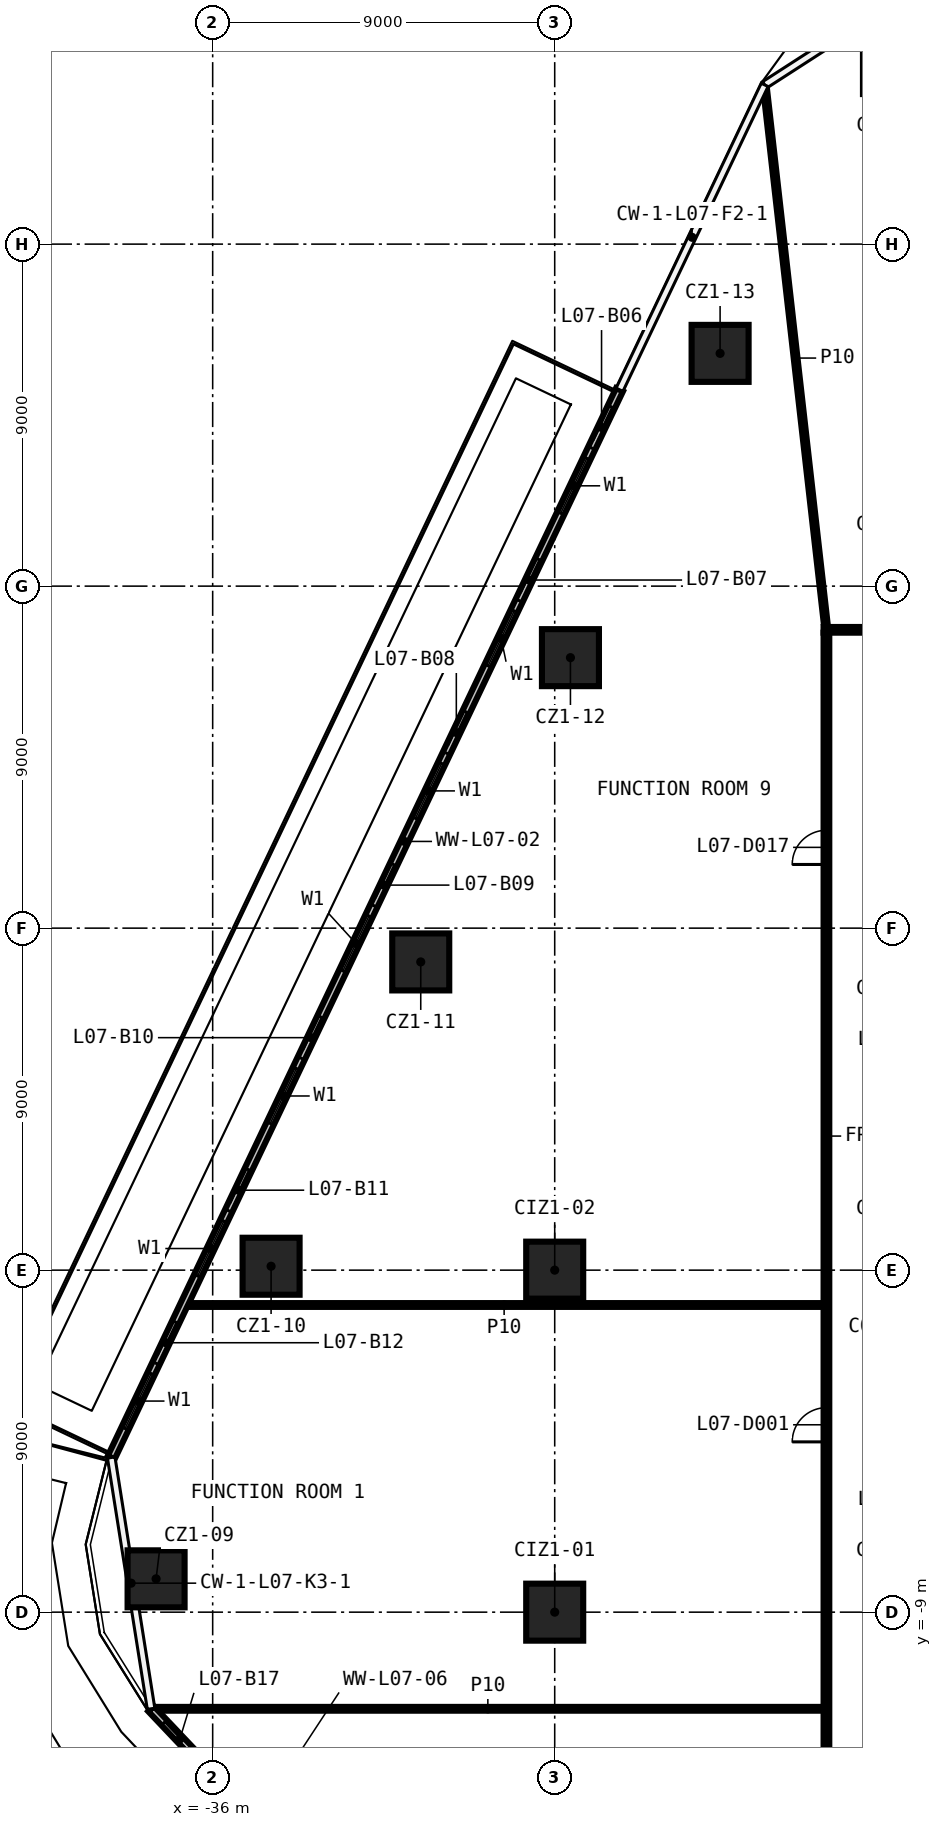
"""IFC4 building model, lengths in metres.
Left out: names, types, materials, properties, quantities, classifications, styles, units other than length and angle.
Written with IfcOpenShell. Run it as: python <this file> out.ifc"""

import sys

from ifc_helpers import new_model, si_unit, direction, frame, frame_2d, origin, origin_2d, place, context, subcontext, project, spatial, rectangle, extrude, element, fill, save


model = new_model("IFC4")
c1 = context("Model", 3, precision=1e-05, world=origin(), true_north=direction((0.0, 1.0)))
c2 = subcontext(c1, "Body", "Model", "MODEL_VIEW")
j1 = project(units=[si_unit("LENGTHUNIT", "METRE"), si_unit("PLANEANGLEUNIT", "RADIAN")], contexts=[c1])
p1 = place(None, origin())
s1 = spatial("IfcSite", under=j1, at=p1, CompositionType="ELEMENT")
p2 = place(p1, origin())
s2 = spatial("IfcBuilding", under=s1, at=p2, CompositionType="ELEMENT")
p3 = place(p2, frame((0.0, 0.0, 47.7)))
s3 = spatial("IfcBuildingStorey", under=s2, at=p3, CompositionType="ELEMENT", Elevation=47.7)
for number, where, z_axis, x_axis in (
    (1, (-37.489, -8.123, 0.0), (0.0, 0.0, 1.0), (1.0, 0.0, 0.0)),
    (2, (-34.463, 0.103, 0.0), (0.0, 0.0, 1.0), (1.0, 0.0, 0.0)),
    (3, (-30.525, 8.111, 0.0), (0.0, 0.0, 1.0), (1.0, 0.0, 0.0)),
    (4, (-26.586, 16.118, 0.0), (0.0, 0.0, 1.0), (1.0, 0.0, 0.0)),
    (5, (-22.648, 24.125, 0.0), (0.0, 0.0, 1.0), (1.0, 0.0, 0.0)),
    (6, (-27.0, -9.0, 0.0), (0.0, 0.0, 1.0), (1.0, 0.0, 0.0)),
    (7, (-27.0, 0.0, 0.0), (0.0, 0.0, 1.0), (1.0, 0.0, 0.0)),
):
    element("IfcColumn", number, at=place(p3, frame(where, z_axis=z_axis, x_axis=x_axis)), inside=s3, PredefinedType="COLUMN", context=c2, shape_type="SweptSolid", body=[
        extrude(rectangle(XDim=1.5, YDim=1.5, at=origin_2d()), origin(), (0.0, 0.0, 1.0), 3.3),
    ])
p4 = place(p3, frame((-37.594, -11.543, 0.0), z_axis=(0.0, 0.0, 1.0), x_axis=(1.0, 0.0, 0.0)))
e8 = element("IfcWall", 8, at=p4, inside=s3, PredefinedType="PARTITIONING", context=c2, shape_type="SweptSolid", body=[
    extrude(rectangle(XDim=17.668, YDim=0.1, at=frame_2d((8.834, 0.0))), origin(), (0.0, 0.0, 1.0), 3.3),
])
p5 = place(p3, frame((-36.737, -0.917, 0.0), z_axis=(0.0, 0.0, 1.0), x_axis=(1.0, 0.0, 0.0)))
e9 = element("IfcWall", 9, at=p5, inside=s3, PredefinedType="PARTITIONING", context=c2, shape_type="SweptSolid", body=[
    extrude(rectangle(XDim=16.812, YDim=0.1, at=frame_2d((8.406, 0.0))), origin(), (0.0, 0.0, 1.0), 3.3),
])
p6 = place(p3, frame((-19.925, 16.85, 0.0), z_axis=(0.0, 0.0, 1.0), x_axis=(1.0, 0.0, 0.0)))
e10 = element("IfcWall", 10, at=p6, inside=s3, PredefinedType="PARTITIONING", context=c2, shape_type="SweptSolid", body=[
    extrude(rectangle(XDim=39.85, YDim=0.15, at=frame_2d((19.925, 0.0))), origin(), (0.0, 0.0, 1.0), 3.3),
])
p7 = place(p6, frame((31.643, 0.0, 0.0)))
e11 = element("IfcOpeningElement", 11, at=p7, cuts=e10, PredefinedType="OPENING", context=c2, shape_type="SweptSolid", body=[
    extrude(rectangle(XDim=0.9, YDim=2.1, at=frame_2d((0.45, 1.05))), frame((0.0, 0.085, 0.0), z_axis=(0.0, -1.0, 0.0), x_axis=(1.0, 0.0, 0.0)), (0.0, 0.0, 1.0), 0.17),
])
p8 = place(p6, frame((22.056, 0.0, 0.0)))
e12 = element("IfcOpeningElement", 12, at=p8, cuts=e10, PredefinedType="OPENING", context=c2, shape_type="SweptSolid", body=[
    extrude(rectangle(XDim=0.9, YDim=2.1, at=frame_2d((0.45, 1.05))), frame((0.0, 0.085, 0.0), z_axis=(0.0, -1.0, 0.0), x_axis=(1.0, 0.0, 0.0)), (0.0, 0.0, 1.0), 0.17),
])
p9 = place(p6, frame((14.831, 0.0, 0.0)))
e13 = element("IfcOpeningElement", 13, at=p9, cuts=e10, PredefinedType="OPENING", context=c2, shape_type="SweptSolid", body=[
    extrude(rectangle(XDim=1.0, YDim=2.1, at=frame_2d((0.5, 1.05))), frame((0.0, 0.085, 0.0), z_axis=(0.0, -1.0, 0.0), x_axis=(1.0, 0.0, 0.0)), (0.0, 0.0, 1.0), 0.17),
])
p10 = place(p3, frame((-19.85, -16.775, 0.0), z_axis=(0.0, 0.0, 1.0), x_axis=(0.0, 1.0, 0.0)))
e14 = element("IfcWall", 14, at=p10, inside=s3, PredefinedType="PARTITIONING", context=c2, shape_type="SweptSolid", body=[
    extrude(rectangle(XDim=33.55, YDim=0.15, at=frame_2d((16.775, 0.0))), origin(), (0.0, 0.0, 1.0), 3.3),
])
p11 = place(p10, frame((12.256, 0.0, 0.0)))
e15 = element("IfcOpeningElement", 15, at=p11, cuts=e14, PredefinedType="OPENING", context=c2, shape_type="SweptSolid", body=[
    extrude(rectangle(XDim=0.9, YDim=2.1, at=frame_2d((0.45, 1.05))), frame((0.0, 0.085, 0.0), z_axis=(0.0, -1.0, 0.0), x_axis=(1.0, 0.0, 0.0)), (0.0, 0.0, 1.0), 0.17),
])
p12 = place(p10, frame((3.254, 0.0, 0.0)))
e16 = element("IfcOpeningElement", 16, at=p12, cuts=e14, PredefinedType="OPENING", context=c2, shape_type="SweptSolid", body=[
    extrude(rectangle(XDim=0.9, YDim=2.1, at=frame_2d((0.45, 1.05))), frame((0.0, 0.085, 0.0), z_axis=(0.0, -1.0, 0.0), x_axis=(1.0, 0.0, 0.0)), (0.0, 0.0, 1.0), 0.17),
])
p13 = place(p10, frame((27.451, 0.0, 0.0)))
e17 = element("IfcOpeningElement", 17, at=p13, cuts=e14, PredefinedType="OPENING", context=c2, shape_type="SweptSolid", body=[
    extrude(rectangle(XDim=0.9, YDim=2.1, at=frame_2d((0.45, 1.05))), frame((0.0, 0.085, 0.0), z_axis=(0.0, -1.0, 0.0), x_axis=(1.0, 0.0, 0.0)), (0.0, 0.0, 1.0), 0.17),
])
p14 = place(p3, frame((-21.472, 31.153, 0.0), z_axis=(0.0, 0.0, 1.0), x_axis=(0.112685540228, -0.993630700524, 0.0)))
e18 = element("IfcWall", 18, at=p14, inside=s3, PredefinedType="PARTITIONING", context=c2, shape_type="SweptSolid", body=[
    extrude(rectangle(XDim=14.395, YDim=0.1, at=frame_2d((7.197, 0.0))), origin(), (0.0, 0.0, 1.0), 3.3),
])
p15 = place(p3, frame((-25.295, 23.168, 0.0), z_axis=(0.0, 0.0, 1.0), x_axis=(-0.429791665344, -0.902928083737, 0.0)))
e19 = element("IfcWall", 19, at=p15, inside=s3, PredefinedType="SOLIDWALL", context=c2, shape_type="SweptSolid", body=[
    extrude(rectangle(XDim=31.12, YDim=0.2, at=frame_2d((15.56, 0.0))), origin(), (0.0, 0.0, 1.0), 3.3),
])
p16 = place(p15, frame((2.0, 0.0, 0.6)))
e20 = element("IfcOpeningElement", 20, at=p16, cuts=e19, PredefinedType="OPENING", context=c2, shape_type="SweptSolid", body=[
    extrude(rectangle(XDim=1.6, YDim=2.4, at=frame_2d((0.8, 1.2))), frame((0.0, 0.11, 0.0), z_axis=(0.0, -1.0, 0.0), x_axis=(1.0, 0.0, 0.0)), (0.0, 0.0, 1.0), 0.22),
])
p17 = place(p15, frame((0.5, 0.0, 0.0)))
e21 = element("IfcOpeningElement", 21, at=p17, cuts=e19, PredefinedType="OPENING", context=c2, shape_type="SweptSolid", body=[
    extrude(rectangle(XDim=1.2, YDim=2.4, at=frame_2d((0.6, 1.2))), frame((0.0, 0.11, 0.0), z_axis=(0.0, -1.0, 0.0), x_axis=(1.0, 0.0, 0.0)), (0.0, 0.0, 1.0), 0.22),
])
p18 = place(p15, frame((6.446, 0.0, 0.6)))
e22 = element("IfcOpeningElement", 22, at=p18, cuts=e19, PredefinedType="OPENING", context=c2, shape_type="SweptSolid", body=[
    extrude(rectangle(XDim=1.6, YDim=2.4, at=frame_2d((0.8, 1.2))), frame((0.0, 0.11, 0.0), z_axis=(0.0, -1.0, 0.0), x_axis=(1.0, 0.0, 0.0)), (0.0, 0.0, 1.0), 0.22),
])
p19 = place(p15, frame((4.946, 0.0, 0.0)))
e23 = element("IfcOpeningElement", 23, at=p19, cuts=e19, PredefinedType="OPENING", context=c2, shape_type="SweptSolid", body=[
    extrude(rectangle(XDim=1.2, YDim=2.4, at=frame_2d((0.6, 1.2))), frame((0.0, 0.11, 0.0), z_axis=(0.0, -1.0, 0.0), x_axis=(1.0, 0.0, 0.0)), (0.0, 0.0, 1.0), 0.22),
])
p20 = place(p15, frame((10.891, 0.0, 0.6)))
e24 = element("IfcOpeningElement", 24, at=p20, cuts=e19, PredefinedType="OPENING", context=c2, shape_type="SweptSolid", body=[
    extrude(rectangle(XDim=1.6, YDim=2.4, at=frame_2d((0.8, 1.2))), frame((0.0, 0.11, 0.0), z_axis=(0.0, -1.0, 0.0), x_axis=(1.0, 0.0, 0.0)), (0.0, 0.0, 1.0), 0.22),
])
p21 = place(p15, frame((9.391, 0.0, 0.0)))
e25 = element("IfcOpeningElement", 25, at=p21, cuts=e19, PredefinedType="OPENING", context=c2, shape_type="SweptSolid", body=[
    extrude(rectangle(XDim=1.2, YDim=2.4, at=frame_2d((0.6, 1.2))), frame((0.0, 0.11, 0.0), z_axis=(0.0, -1.0, 0.0), x_axis=(1.0, 0.0, 0.0)), (0.0, 0.0, 1.0), 0.22),
])
p22 = place(p15, frame((15.337, 0.0, 0.6)))
e26 = element("IfcOpeningElement", 26, at=p22, cuts=e19, PredefinedType="OPENING", context=c2, shape_type="SweptSolid", body=[
    extrude(rectangle(XDim=1.6, YDim=2.4, at=frame_2d((0.8, 1.2))), frame((0.0, 0.11, 0.0), z_axis=(0.0, -1.0, 0.0), x_axis=(1.0, 0.0, 0.0)), (0.0, 0.0, 1.0), 0.22),
])
p23 = place(p15, frame((13.837, 0.0, 0.0)))
e27 = element("IfcOpeningElement", 27, at=p23, cuts=e19, PredefinedType="OPENING", context=c2, shape_type="SweptSolid", body=[
    extrude(rectangle(XDim=1.2, YDim=2.4, at=frame_2d((0.6, 1.2))), frame((0.0, 0.11, 0.0), z_axis=(0.0, -1.0, 0.0), x_axis=(1.0, 0.0, 0.0)), (0.0, 0.0, 1.0), 0.22),
])
p24 = place(p15, frame((19.783, 0.0, 0.6)))
e28 = element("IfcOpeningElement", 28, at=p24, cuts=e19, PredefinedType="OPENING", context=c2, shape_type="SweptSolid", body=[
    extrude(rectangle(XDim=1.6, YDim=2.4, at=frame_2d((0.8, 1.2))), frame((0.0, 0.11, 0.0), z_axis=(0.0, -1.0, 0.0), x_axis=(1.0, 0.0, 0.0)), (0.0, 0.0, 1.0), 0.22),
])
p25 = place(p15, frame((18.283, 0.0, 0.0)))
e29 = element("IfcOpeningElement", 29, at=p25, cuts=e19, PredefinedType="OPENING", context=c2, shape_type="SweptSolid", body=[
    extrude(rectangle(XDim=1.2, YDim=2.4, at=frame_2d((0.6, 1.2))), frame((0.0, 0.11, 0.0), z_axis=(0.0, -1.0, 0.0), x_axis=(1.0, 0.0, 0.0)), (0.0, 0.0, 1.0), 0.22),
])
p26 = place(p15, frame((24.229, 0.0, 0.6)))
e30 = element("IfcOpeningElement", 30, at=p26, cuts=e19, PredefinedType="OPENING", context=c2, shape_type="SweptSolid", body=[
    extrude(rectangle(XDim=1.6, YDim=2.4, at=frame_2d((0.8, 1.2))), frame((0.0, 0.11, 0.0), z_axis=(0.0, -1.0, 0.0), x_axis=(1.0, 0.0, 0.0)), (0.0, 0.0, 1.0), 0.22),
])
p27 = place(p15, frame((22.729, 0.0, 0.0)))
e31 = element("IfcOpeningElement", 31, at=p27, cuts=e19, PredefinedType="OPENING", context=c2, shape_type="SweptSolid", body=[
    extrude(rectangle(XDim=1.2, YDim=2.4, at=frame_2d((0.6, 1.2))), frame((0.0, 0.11, 0.0), z_axis=(0.0, -1.0, 0.0), x_axis=(1.0, 0.0, 0.0)), (0.0, 0.0, 1.0), 0.22),
])
p28 = place(p15, frame((28.674, 0.0, 0.6)))
e32 = element("IfcOpeningElement", 32, at=p28, cuts=e19, PredefinedType="OPENING", context=c2, shape_type="SweptSolid", body=[
    extrude(rectangle(XDim=1.6, YDim=2.4, at=frame_2d((0.8, 1.2))), frame((0.0, 0.11, 0.0), z_axis=(0.0, -1.0, 0.0), x_axis=(1.0, 0.0, 0.0)), (0.0, 0.0, 1.0), 0.22),
])
p29 = place(p15, frame((27.174, 0.0, 0.0)))
e33 = element("IfcOpeningElement", 33, at=p29, cuts=e19, PredefinedType="OPENING", context=c2, shape_type="SweptSolid", body=[
    extrude(rectangle(XDim=1.2, YDim=2.4, at=frame_2d((0.6, 1.2))), frame((0.0, 0.11, 0.0), z_axis=(0.0, -1.0, 0.0), x_axis=(1.0, 0.0, 0.0)), (0.0, 0.0, 1.0), 0.22),
])
p30 = place(p3, frame((-37.621, -11.543, 0.0), z_axis=(0.0, 0.0, 1.0), x_axis=(0.688100005166, -0.725615864553, 0.0)))
e34 = element("IfcWall", 34, at=p30, inside=s3, PredefinedType="SOLIDWALL", context=c2, shape_type="SweptSolid", body=[
    extrude(rectangle(XDim=4.21, YDim=0.2, at=frame_2d((2.105, 0.0))), origin(), (0.0, 0.0, 1.0), 3.3),
])
p31 = place(p30, frame((2.0, 0.0, 0.6)))
e35 = element("IfcOpeningElement", 35, at=p31, cuts=e34, PredefinedType="OPENING", context=c2, shape_type="SweptSolid", body=[
    extrude(rectangle(XDim=1.6, YDim=2.4, at=frame_2d((0.8, 1.2))), frame((0.0, 0.11, 0.0), z_axis=(0.0, -1.0, 0.0), x_axis=(1.0, 0.0, 0.0)), (0.0, 0.0, 1.0), 0.22),
])
p32 = place(p30, frame((0.5, 0.0, 0.0)))
e36 = element("IfcOpeningElement", 36, at=p32, cuts=e34, PredefinedType="OPENING", context=c2, shape_type="SweptSolid", body=[
    extrude(rectangle(XDim=1.2, YDim=2.4, at=frame_2d((0.6, 1.2))), frame((0.0, 0.11, 0.0), z_axis=(0.0, -1.0, 0.0), x_axis=(1.0, 0.0, 0.0)), (0.0, 0.0, 1.0), 0.22),
])
p33 = place(p11, origin())
e37 = element("IfcDoor", 37, at=p33, inside=s3, OperationType="SINGLE_SWING_RIGHT", PredefinedType="DOOR", context=c2, shape_type="SweptSolid", body=[
    extrude(rectangle(XDim=0.9, YDim=2.1, at=frame_2d((0.45, 1.05))), frame((0.0, 0.025, 0.0), z_axis=(0.0, -1.0, 0.0), x_axis=(1.0, 0.0, 0.0)), (0.0, 0.0, 1.0), 0.05),
])
fill(e15, e37)
p34 = place(p13, origin())
e38 = element("IfcDoor", 38, at=p34, inside=s3, OperationType="SINGLE_SWING_LEFT", PredefinedType="DOOR", context=c2, shape_type="SweptSolid", body=[
    extrude(rectangle(XDim=0.9, YDim=2.1, at=frame_2d((0.45, 1.05))), frame((0.0, 0.025, 0.0), z_axis=(0.0, -1.0, 0.0), x_axis=(1.0, 0.0, 0.0)), (0.0, 0.0, 1.0), 0.05),
])
fill(e17, e38)
p35 = place(p16, origin())
e39 = element("IfcWindow", 39, at=p35, inside=s3, PartitioningType="SINGLE_PANEL", PredefinedType="WINDOW", context=c2, shape_type="SweptSolid", body=[
    extrude(rectangle(XDim=1.6, YDim=2.4, at=frame_2d((0.8, 1.2))), frame((0.0, 0.03, 0.0), z_axis=(0.0, -1.0, 0.0), x_axis=(1.0, 0.0, 0.0)), (0.0, 0.0, 1.0), 0.06),
])
fill(e20, e39)
p36 = place(p17, origin())
e40 = element("IfcDoor", 40, at=p36, inside=s3, OperationType="SLIDING_TO_LEFT", PredefinedType="DOOR", context=c2, shape_type="SweptSolid", body=[
    extrude(rectangle(XDim=1.2, YDim=2.4, at=frame_2d((0.6, 1.2))), frame((0.0, 0.025, 0.0), z_axis=(0.0, -1.0, 0.0), x_axis=(1.0, 0.0, 0.0)), (0.0, 0.0, 1.0), 0.05),
])
fill(e21, e40)
p37 = place(p18, origin())
e41 = element("IfcWindow", 41, at=p37, inside=s3, PartitioningType="SINGLE_PANEL", PredefinedType="WINDOW", context=c2, shape_type="SweptSolid", body=[
    extrude(rectangle(XDim=1.6, YDim=2.4, at=frame_2d((0.8, 1.2))), frame((0.0, 0.03, 0.0), z_axis=(0.0, -1.0, 0.0), x_axis=(1.0, 0.0, 0.0)), (0.0, 0.0, 1.0), 0.06),
])
fill(e22, e41)
p38 = place(p19, origin())
e42 = element("IfcDoor", 42, at=p38, inside=s3, OperationType="SLIDING_TO_LEFT", PredefinedType="DOOR", context=c2, shape_type="SweptSolid", body=[
    extrude(rectangle(XDim=1.2, YDim=2.4, at=frame_2d((0.6, 1.2))), frame((0.0, 0.025, 0.0), z_axis=(0.0, -1.0, 0.0), x_axis=(1.0, 0.0, 0.0)), (0.0, 0.0, 1.0), 0.05),
])
fill(e23, e42)
p39 = place(p20, origin())
e43 = element("IfcWindow", 43, at=p39, inside=s3, PartitioningType="SINGLE_PANEL", PredefinedType="WINDOW", context=c2, shape_type="SweptSolid", body=[
    extrude(rectangle(XDim=1.6, YDim=2.4, at=frame_2d((0.8, 1.2))), frame((0.0, 0.03, 0.0), z_axis=(0.0, -1.0, 0.0), x_axis=(1.0, 0.0, 0.0)), (0.0, 0.0, 1.0), 0.06),
])
fill(e24, e43)
p40 = place(p21, origin())
e44 = element("IfcDoor", 44, at=p40, inside=s3, OperationType="SLIDING_TO_LEFT", PredefinedType="DOOR", context=c2, shape_type="SweptSolid", body=[
    extrude(rectangle(XDim=1.2, YDim=2.4, at=frame_2d((0.6, 1.2))), frame((0.0, 0.025, 0.0), z_axis=(0.0, -1.0, 0.0), x_axis=(1.0, 0.0, 0.0)), (0.0, 0.0, 1.0), 0.05),
])
fill(e25, e44)
p41 = place(p22, origin())
e45 = element("IfcWindow", 45, at=p41, inside=s3, PartitioningType="SINGLE_PANEL", PredefinedType="WINDOW", context=c2, shape_type="SweptSolid", body=[
    extrude(rectangle(XDim=1.6, YDim=2.4, at=frame_2d((0.8, 1.2))), frame((0.0, 0.03, 0.0), z_axis=(0.0, -1.0, 0.0), x_axis=(1.0, 0.0, 0.0)), (0.0, 0.0, 1.0), 0.06),
])
fill(e26, e45)
p42 = place(p23, origin())
e46 = element("IfcDoor", 46, at=p42, inside=s3, OperationType="SLIDING_TO_LEFT", PredefinedType="DOOR", context=c2, shape_type="SweptSolid", body=[
    extrude(rectangle(XDim=1.2, YDim=2.4, at=frame_2d((0.6, 1.2))), frame((0.0, 0.025, 0.0), z_axis=(0.0, -1.0, 0.0), x_axis=(1.0, 0.0, 0.0)), (0.0, 0.0, 1.0), 0.05),
])
fill(e27, e46)
p43 = place(p24, origin())
e47 = element("IfcWindow", 47, at=p43, inside=s3, PartitioningType="SINGLE_PANEL", PredefinedType="WINDOW", context=c2, shape_type="SweptSolid", body=[
    extrude(rectangle(XDim=1.6, YDim=2.4, at=frame_2d((0.8, 1.2))), frame((0.0, 0.03, 0.0), z_axis=(0.0, -1.0, 0.0), x_axis=(1.0, 0.0, 0.0)), (0.0, 0.0, 1.0), 0.06),
])
fill(e28, e47)
p44 = place(p25, origin())
e48 = element("IfcDoor", 48, at=p44, inside=s3, OperationType="SLIDING_TO_LEFT", PredefinedType="DOOR", context=c2, shape_type="SweptSolid", body=[
    extrude(rectangle(XDim=1.2, YDim=2.4, at=frame_2d((0.6, 1.2))), frame((0.0, 0.025, 0.0), z_axis=(0.0, -1.0, 0.0), x_axis=(1.0, 0.0, 0.0)), (0.0, 0.0, 1.0), 0.05),
])
fill(e29, e48)
p45 = place(p26, origin())
e49 = element("IfcWindow", 49, at=p45, inside=s3, PartitioningType="SINGLE_PANEL", PredefinedType="WINDOW", context=c2, shape_type="SweptSolid", body=[
    extrude(rectangle(XDim=1.6, YDim=2.4, at=frame_2d((0.8, 1.2))), frame((0.0, 0.03, 0.0), z_axis=(0.0, -1.0, 0.0), x_axis=(1.0, 0.0, 0.0)), (0.0, 0.0, 1.0), 0.06),
])
fill(e30, e49)
p46 = place(p27, origin())
e50 = element("IfcDoor", 50, at=p46, inside=s3, OperationType="SLIDING_TO_LEFT", PredefinedType="DOOR", context=c2, shape_type="SweptSolid", body=[
    extrude(rectangle(XDim=1.2, YDim=2.4, at=frame_2d((0.6, 1.2))), frame((0.0, 0.025, 0.0), z_axis=(0.0, -1.0, 0.0), x_axis=(1.0, 0.0, 0.0)), (0.0, 0.0, 1.0), 0.05),
])
fill(e31, e50)
p47 = place(p28, origin())
e51 = element("IfcWindow", 51, at=p47, inside=s3, PartitioningType="SINGLE_PANEL", PredefinedType="WINDOW", context=c2, shape_type="SweptSolid", body=[
    extrude(rectangle(XDim=1.6, YDim=2.4, at=frame_2d((0.8, 1.2))), frame((0.0, 0.03, 0.0), z_axis=(0.0, -1.0, 0.0), x_axis=(1.0, 0.0, 0.0)), (0.0, 0.0, 1.0), 0.06),
])
fill(e32, e51)
p48 = place(p29, origin())
e52 = element("IfcDoor", 52, at=p48, inside=s3, OperationType="SLIDING_TO_LEFT", PredefinedType="DOOR", context=c2, shape_type="SweptSolid", body=[
    extrude(rectangle(XDim=1.2, YDim=2.4, at=frame_2d((0.6, 1.2))), frame((0.0, 0.025, 0.0), z_axis=(0.0, -1.0, 0.0), x_axis=(1.0, 0.0, 0.0)), (0.0, 0.0, 1.0), 0.05),
])
fill(e33, e52)
p49 = place(p32, origin())
e53 = element("IfcDoor", 53, at=p49, inside=s3, OperationType="SLIDING_TO_LEFT", PredefinedType="DOOR", context=c2, shape_type="SweptSolid", body=[
    extrude(rectangle(XDim=1.2, YDim=2.4, at=frame_2d((0.6, 1.2))), frame((0.0, 0.025, 0.0), z_axis=(0.0, -1.0, 0.0), x_axis=(1.0, 0.0, 0.0)), (0.0, 0.0, 1.0), 0.05),
])
fill(e36, e53)
save(model, sys.argv[1])
